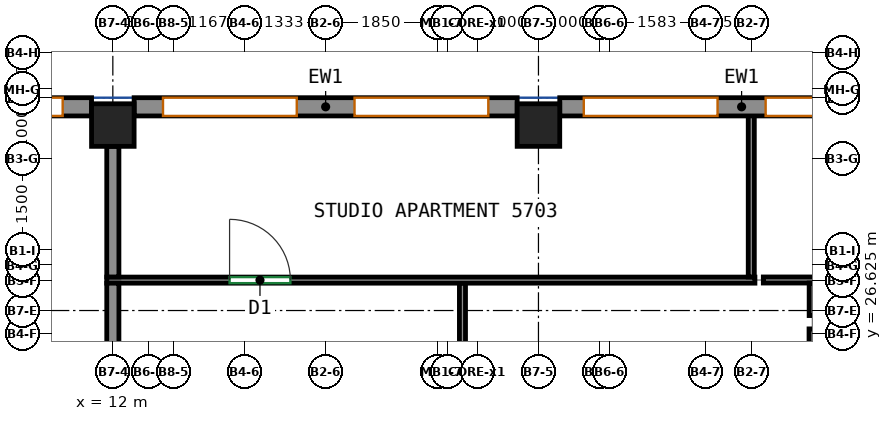
"""IFC4 building model, lengths in metres.
Left out: names, types, materials, properties, quantities, classifications, styles, units other than length and angle.
Written with IfcOpenShell. Run it as: python <this file> out.ifc"""

import sys

from ifc_helpers import new_model, si_unit, direction, frame, frame_2d, origin, origin_2d, place, context, subcontext, project, spatial, rectangle, extrude, source, transform, mapped, element, fill, save


model = new_model("IFC4")
c1 = context("Model", 3, precision=1e-05, world=origin(), true_north=direction((0.0, 1.0)))
c2 = subcontext(c1, "Body", "Model", "MODEL_VIEW")
j1 = project(units=[si_unit("LENGTHUNIT", "METRE"), si_unit("PLANEANGLEUNIT", "RADIAN")], contexts=[c1])
p1 = place(None, origin())
s1 = spatial("IfcSite", under=j1, at=p1, CompositionType="ELEMENT")
p2 = place(p1, origin())
s2 = spatial("IfcBuilding", under=s1, at=p2, CompositionType="ELEMENT")
p3 = place(p2, frame((0.0, 0.0, 239.0)))
s3 = spatial("IfcBuildingStorey", under=s2, at=p3, CompositionType="ELEMENT", Elevation=239.0)
m1 = source(origin(), c2, "Body", "SweptSolid", [
    extrude(rectangle(XDim=0.7, YDim=0.7, at=origin_2d()), origin(), (0.0, 0.0, 1.0), 3.12),
])
for number, where, z_axis, x_axis in (
    (1, (12.0, 30.05, 0.0), (0.0, 0.0, 1.0), (1.0, 0.0, 0.0)),
    (2, (19.0, 30.05, 0.0), (0.0, 0.0, 1.0), (1.0, 0.0, 0.0)),
):
    element("IfcColumn", number, at=place(p3, frame(where, z_axis=z_axis, x_axis=x_axis)), inside=s3, PredefinedType="COLUMN", context=c2, shape_type="MappedRepresentation", body=[
        mapped(m1, transform((0.0, 0.0, 0.0))),
    ])
m2 = source(origin(), c2, "Body", "SweptSolid", [
    extrude(rectangle(XDim=5.982, YDim=0.3, at=frame_2d((2.991, 0.0))), origin(), (0.0, 0.0, 1.0), 3.12),
])
p4 = place(p3, frame((25.332, 30.35, 0.0), z_axis=(0.0, 0.0, 1.0), x_axis=(-1.0, 0.0, 0.0)))
e3 = element("IfcWall", 3, at=p4, inside=s3, PredefinedType="SOLIDWALL", context=c2, shape_type="MappedRepresentation", body=[
    mapped(m2, transform((0.0, 0.0, 0.0))),
])
p5 = place(p4, frame((0.396, 0.0, 0.8)))
e4 = element("IfcOpeningElement", 4, at=p5, cuts=e3, PredefinedType="OPENING", context=c2, shape_type="SweptSolid", body=[
    extrude(rectangle(XDim=2.2, YDim=2.05, at=frame_2d((1.1, 1.025))), frame((0.0, 0.16, 0.0), z_axis=(0.0, -1.0, 0.0), x_axis=(1.0, 0.0, 0.0)), (0.0, 0.0, 1.0), 0.32),
])
p6 = place(p4, frame((3.386, 0.0, 0.8)))
e5 = element("IfcOpeningElement", 5, at=p6, cuts=e3, PredefinedType="OPENING", context=c2, shape_type="SweptSolid", body=[
    extrude(rectangle(XDim=2.2, YDim=2.05, at=frame_2d((1.1, 1.025))), frame((0.0, 0.16, 0.0), z_axis=(0.0, -1.0, 0.0), x_axis=(1.0, 0.0, 0.0)), (0.0, 0.0, 1.0), 0.32),
])
m3 = source(origin(), c2, "Body", "SweptSolid", [
    extrude(rectangle(XDim=6.3, YDim=0.3, at=frame_2d((3.15, 0.0))), origin(), (0.0, 0.0, 1.0), 3.12),
])
p7 = place(p3, frame((18.65, 30.35, 0.0), z_axis=(0.0, 0.0, 1.0), x_axis=(-1.0, 0.0, 0.0)))
e6 = element("IfcWall", 6, at=p7, inside=s3, PredefinedType="SOLIDWALL", context=c2, shape_type="MappedRepresentation", body=[
    mapped(m3, transform((0.0, 0.0, 0.0))),
])
p8 = place(p7, frame((0.475, 0.0, 0.8)))
e7 = element("IfcOpeningElement", 7, at=p8, cuts=e6, PredefinedType="OPENING", context=c2, shape_type="SweptSolid", body=[
    extrude(rectangle(XDim=2.2, YDim=2.05, at=frame_2d((1.1, 1.025))), frame((0.0, 0.16, 0.0), z_axis=(0.0, -1.0, 0.0), x_axis=(1.0, 0.0, 0.0)), (0.0, 0.0, 1.0), 0.32),
])
p9 = place(p7, frame((3.625, 0.0, 0.8)))
e8 = element("IfcOpeningElement", 8, at=p9, cuts=e6, PredefinedType="OPENING", context=c2, shape_type="SweptSolid", body=[
    extrude(rectangle(XDim=2.2, YDim=2.05, at=frame_2d((1.1, 1.025))), frame((0.0, 0.16, 0.0), z_axis=(0.0, -1.0, 0.0), x_axis=(1.0, 0.0, 0.0)), (0.0, 0.0, 1.0), 0.32),
])
p10 = place(p3, frame((11.65, 30.35, 0.0), z_axis=(0.0, 0.0, 1.0), x_axis=(-1.0, 0.0, 0.0)))
e9 = element("IfcWall", 9, at=p10, inside=s3, PredefinedType="SOLIDWALL", context=c2, shape_type="MappedRepresentation", body=[
    mapped(m3, transform((0.0, 0.0, 0.0))),
])
p11 = place(p10, frame((0.475, 0.0, 0.8)))
e10 = element("IfcOpeningElement", 10, at=p11, cuts=e9, PredefinedType="OPENING", context=c2, shape_type="SweptSolid", body=[
    extrude(rectangle(XDim=2.2, YDim=2.05, at=frame_2d((1.1, 1.025))), frame((0.0, 0.16, 0.0), z_axis=(0.0, -1.0, 0.0), x_axis=(1.0, 0.0, 0.0)), (0.0, 0.0, 1.0), 0.32),
])
p12 = place(p10, frame((3.625, 0.0, 0.8)))
e11 = element("IfcOpeningElement", 11, at=p12, cuts=e9, PredefinedType="OPENING", context=c2, shape_type="SweptSolid", body=[
    extrude(rectangle(XDim=2.2, YDim=2.05, at=frame_2d((1.1, 1.025))), frame((0.0, 0.16, 0.0), z_axis=(0.0, -1.0, 0.0), x_axis=(1.0, 0.0, 0.0)), (0.0, 0.0, 1.0), 0.32),
])
p13 = place(p3, frame((17.75, 24.877, 0.0), z_axis=(0.0, 0.0, 1.0), x_axis=(0.0, 1.0, 0.0)))
e12 = element("IfcWall", 12, at=p13, inside=s3, PredefinedType="PARTITIONING", context=c2, shape_type="SweptSolid", body=[
    extrude(rectangle(XDim=2.573, YDim=0.1, at=frame_2d((1.287, 0.0))), origin(), (0.0, 0.0, 1.0), 3.12),
])
p14 = place(p13, frame((0.307, 0.0, 0.0)))
e13 = element("IfcOpeningElement", 13, at=p14, cuts=e12, PredefinedType="OPENING", context=c2, shape_type="SweptSolid", body=[
    extrude(rectangle(XDim=1.0, YDim=2.1, at=frame_2d((0.5, 1.05))), frame((0.0, 0.06, 0.0), z_axis=(0.0, -1.0, 0.0), x_axis=(1.0, 0.0, 0.0)), (0.0, 0.0, 1.0), 0.12),
])
p15 = place(p3, frame((11.9, 27.5, 0.0), z_axis=(0.0, 0.0, 1.0), x_axis=(1.0, 0.0, 0.0)))
e14 = element("IfcWall", 14, at=p15, inside=s3, PredefinedType="PARTITIONING", context=c2, shape_type="SweptSolid", body=[
    extrude(rectangle(XDim=10.66, YDim=0.1, at=frame_2d((5.33, 0.0))), origin(), (0.0, 0.0, 1.0), 3.12),
])
p16 = place(p15, frame((2.02, 0.0, 0.0)))
e15 = element("IfcOpeningElement", 15, at=p16, cuts=e14, PredefinedType="OPENING", context=c2, shape_type="SweptSolid", body=[
    extrude(rectangle(XDim=1.0, YDim=2.1, at=frame_2d((0.5, 1.05))), frame((0.0, 0.06, 0.0), z_axis=(0.0, -1.0, 0.0), x_axis=(1.0, 0.0, 0.0)), (0.0, 0.0, 1.0), 0.12),
])
p17 = place(p3, frame((12.0, 24.877, 0.0), z_axis=(0.0, 0.0, 1.0), x_axis=(0.0, 1.0, 0.0)))
e16 = element("IfcWall", 16, at=p17, inside=s3, PredefinedType="PARTITIONING", context=c2, shape_type="SweptSolid", body=[
    extrude(rectangle(XDim=2.573, YDim=0.2, at=frame_2d((1.287, 0.0))), origin(), (0.0, 0.0, 1.0), 3.12),
])
p18 = place(p3, frame((23.552, 27.502, 0.0), z_axis=(0.0, 0.0, 1.0), x_axis=(-1.0, 0.0, 0.0)))
e17 = element("IfcWall", 17, at=p18, inside=s3, PredefinedType="PARTITIONING", context=c2, shape_type="SweptSolid", body=[
    extrude(rectangle(XDim=0.854, YDim=0.1, at=frame_2d((0.427, 0.0))), origin(), (0.0, 0.0, 1.0), 3.12),
])
p19 = place(p3, frame((23.502, 26.917, 0.0), z_axis=(0.0, 0.0, 1.0), x_axis=(0.0, 1.0, 0.0)))
e18 = element("IfcWall", 18, at=p19, inside=s3, PredefinedType="PARTITIONING", context=c2, shape_type="SweptSolid", body=[
    extrude(rectangle(XDim=0.535, YDim=0.1, at=frame_2d((0.268, 0.0))), origin(), (0.0, 0.0, 1.0), 3.12),
])
p20 = place(p3, frame((23.5, 26.165, 0.0), z_axis=(0.0, 0.0, 1.0), x_axis=(0.0, 1.0, 0.0)))
e19 = element("IfcWall", 19, at=p20, inside=s3, PredefinedType="PARTITIONING", context=c2, shape_type="SweptSolid", body=[
    extrude(rectangle(XDim=0.533, YDim=0.1, at=frame_2d((0.267, 0.0))), origin(), (0.0, 0.0, 1.0), 3.12),
])
p21 = place(p3, frame((22.5, 27.552, 0.0), z_axis=(0.0, 0.0, 1.0), x_axis=(0.0, 1.0, 0.0)))
e20 = element("IfcWall", 20, at=p21, inside=s3, PredefinedType="PARTITIONING", context=c2, shape_type="SweptSolid", body=[
    extrude(rectangle(XDim=2.698, YDim=0.1, at=frame_2d((1.349, 0.0))), origin(), (0.0, 0.0, 1.0), 3.12),
])
p22 = place(p3, frame((12.0, 27.552, 0.0), z_axis=(0.0, 0.0, 1.0), x_axis=(0.0, 1.0, 0.0)))
e21 = element("IfcWall", 21, at=p22, inside=s3, PredefinedType="PARTITIONING", context=c2, shape_type="SweptSolid", body=[
    extrude(rectangle(XDim=2.148, YDim=0.2, at=frame_2d((1.074, 0.0))), origin(), (0.0, 0.0, 1.0), 3.12),
])
p23 = place(p5, origin())
e22 = element("IfcWindow", 22, at=p23, inside=s3, PartitioningType="SINGLE_PANEL", PredefinedType="WINDOW", context=c2, shape_type="SweptSolid", body=[
    extrude(rectangle(XDim=2.2, YDim=2.05, at=frame_2d((1.1, 1.025))), frame((0.0, 0.03, 0.0), z_axis=(0.0, -1.0, 0.0), x_axis=(1.0, 0.0, 0.0)), (0.0, 0.0, 1.0), 0.06),
])
fill(e4, e22)
p24 = place(p6, origin())
e23 = element("IfcWindow", 23, at=p24, inside=s3, PartitioningType="SINGLE_PANEL", PredefinedType="WINDOW", context=c2, shape_type="SweptSolid", body=[
    extrude(rectangle(XDim=2.2, YDim=2.05, at=frame_2d((1.1, 1.025))), frame((0.0, 0.03, 0.0), z_axis=(0.0, -1.0, 0.0), x_axis=(1.0, 0.0, 0.0)), (0.0, 0.0, 1.0), 0.06),
])
fill(e5, e23)
p25 = place(p8, origin())
e24 = element("IfcWindow", 24, at=p25, inside=s3, PartitioningType="SINGLE_PANEL", PredefinedType="WINDOW", context=c2, shape_type="SweptSolid", body=[
    extrude(rectangle(XDim=2.2, YDim=2.05, at=frame_2d((1.1, 1.025))), frame((0.0, 0.03, 0.0), z_axis=(0.0, -1.0, 0.0), x_axis=(1.0, 0.0, 0.0)), (0.0, 0.0, 1.0), 0.06),
])
fill(e7, e24)
p26 = place(p9, origin())
e25 = element("IfcWindow", 25, at=p26, inside=s3, PartitioningType="SINGLE_PANEL", PredefinedType="WINDOW", context=c2, shape_type="SweptSolid", body=[
    extrude(rectangle(XDim=2.2, YDim=2.05, at=frame_2d((1.1, 1.025))), frame((0.0, 0.03, 0.0), z_axis=(0.0, -1.0, 0.0), x_axis=(1.0, 0.0, 0.0)), (0.0, 0.0, 1.0), 0.06),
])
fill(e8, e25)
p27 = place(p11, origin())
e26 = element("IfcWindow", 26, at=p27, inside=s3, PartitioningType="SINGLE_PANEL", PredefinedType="WINDOW", context=c2, shape_type="SweptSolid", body=[
    extrude(rectangle(XDim=2.2, YDim=2.05, at=frame_2d((1.1, 1.025))), frame((0.0, 0.03, 0.0), z_axis=(0.0, -1.0, 0.0), x_axis=(1.0, 0.0, 0.0)), (0.0, 0.0, 1.0), 0.06),
])
fill(e10, e26)
p28 = place(p16, origin())
e27 = element("IfcDoor", 27, at=p28, inside=s3, OperationType="SINGLE_SWING_LEFT", PredefinedType="DOOR", context=c2, shape_type="SweptSolid", body=[
    extrude(rectangle(XDim=1.0, YDim=2.1, at=frame_2d((0.5, 1.05))), frame((0.0, 0.025, 0.0), z_axis=(0.0, -1.0, 0.0), x_axis=(1.0, 0.0, 0.0)), (0.0, 0.0, 1.0), 0.05),
])
fill(e15, e27)
save(model, sys.argv[1])
